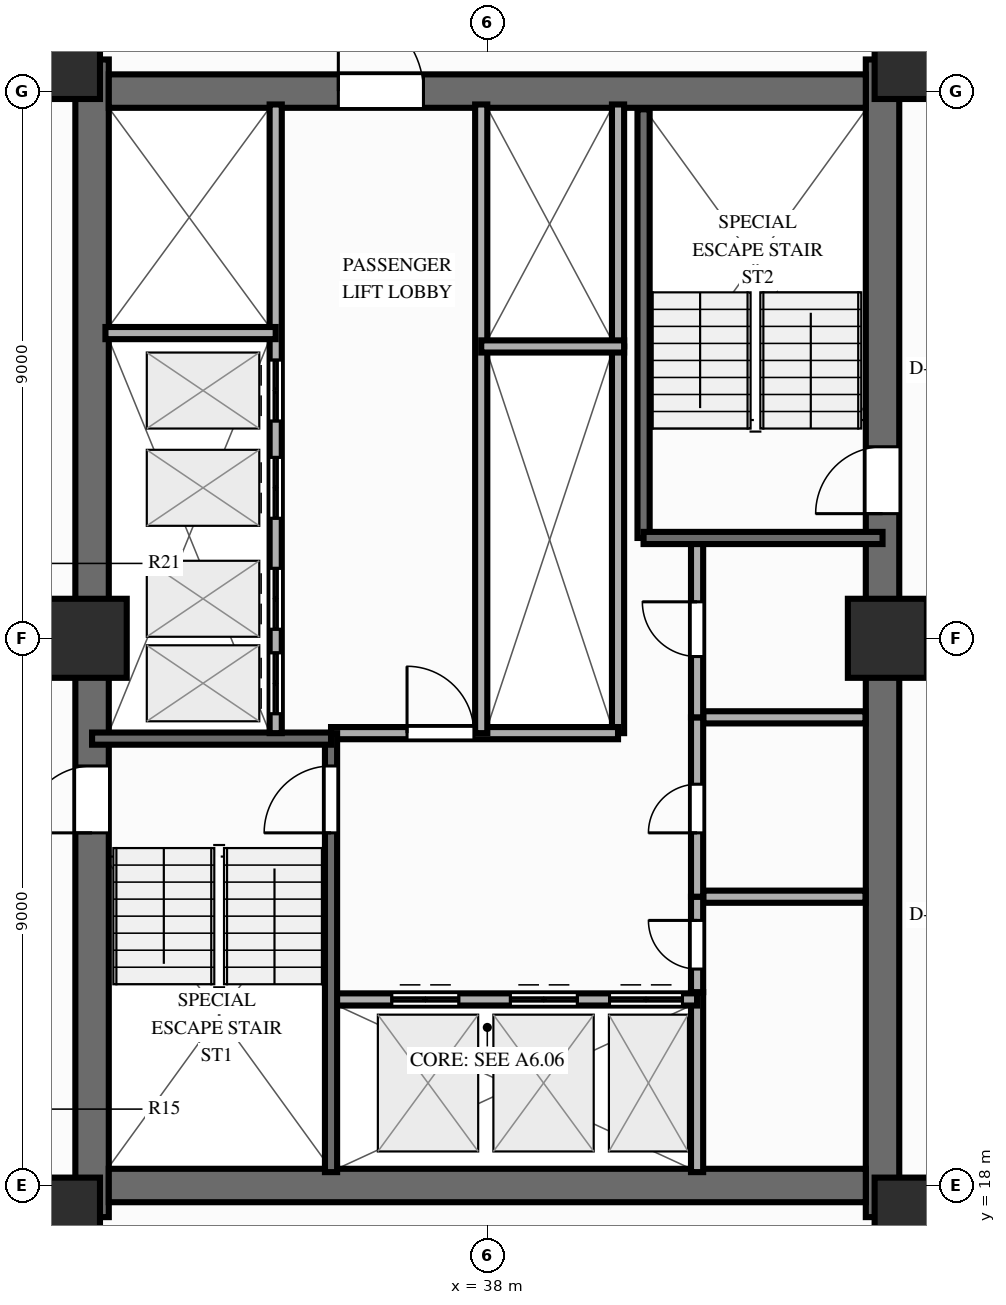
"""IFC4 building model, lengths in metres.
Left out: names, types, materials, properties, quantities, classifications, styles, units other than length and angle.
Written with IfcOpenShell. Run it as: python <this file> out.ifc"""

import sys

from ifc_helpers import new_model, si_unit, direction, frame, frame_2d, origin, origin_2d, place, context, subcontext, project, spatial, rectangle, extrude, source, transform, mapped, element, fill, save


model = new_model("IFC4")
c1 = context("Model", 3, precision=1e-05, world=origin(), true_north=direction((0.0, 1.0)))
c2 = subcontext(c1, "Body", "Model", "MODEL_VIEW")
j1 = project(units=[si_unit("LENGTHUNIT", "METRE"), si_unit("PLANEANGLEUNIT", "RADIAN")], contexts=[c1])
p1 = place(None, origin())
s1 = spatial("IfcSite", under=j1, at=p1, CompositionType="ELEMENT")
p2 = place(p1, origin())
s2 = spatial("IfcBuilding", under=s1, at=p2, CompositionType="ELEMENT")
p3 = place(p2, frame((0.0, 0.0, 80.85)))
s3 = spatial("IfcBuildingStorey", under=s2, at=p3, CompositionType="ELEMENT", Elevation=80.85)
p4 = place(p3, frame((31.5, 17.48, 0.0), z_axis=(0.0, 0.0, 1.0), x_axis=(0.0, 1.0, 0.0)))
e1 = element("IfcWall", 1, at=p4, inside=s3, PredefinedType="SHEAR", context=c2, shape_type="SweptSolid", body=[
    extrude(rectangle(XDim=19.04, YDim=0.55, at=frame_2d((9.52, 0.0))), origin(), (0.0, 0.0, 1.0), 3.0),
])
p5 = place(p4, frame((6.32, 0.0, 0.0)))
e2 = element("IfcOpeningElement", 2, at=p5, cuts=e1, PredefinedType="OPENING", context=c2, shape_type="SweptSolid", body=[
    extrude(rectangle(XDim=1.1, YDim=2.15, at=frame_2d((0.55, 1.075))), frame((0.0, 0.287, 0.0), z_axis=(0.0, -1.0, 0.0), x_axis=(1.0, 0.0, 0.0)), (0.0, 0.0, 1.0), 0.574),
])
p6 = place(p3, frame((44.5, 17.48, 0.0), z_axis=(0.0, 0.0, 1.0), x_axis=(0.0, 1.0, 0.0)))
e3 = element("IfcWall", 3, at=p6, inside=s3, PredefinedType="SHEAR", context=c2, shape_type="SweptSolid", body=[
    extrude(rectangle(XDim=19.04, YDim=0.55, at=frame_2d((9.52, 0.0))), origin(), (0.0, 0.0, 1.0), 3.0),
])
p7 = place(p6, frame((12.67, 0.0, 0.0), z_axis=(0.0, 0.0, 1.0), x_axis=(-1.0, 0.0, 0.0)))
e4 = element("IfcOpeningElement", 4, at=p7, cuts=e3, PredefinedType="OPENING", context=c2, shape_type="SweptSolid", body=[
    extrude(rectangle(XDim=1.1, YDim=2.15, at=frame_2d((0.55, 1.075))), frame((0.0, 0.287, 0.0), z_axis=(0.0, -1.0, 0.0), x_axis=(1.0, 0.0, 0.0)), (0.0, 0.0, 1.0), 0.574),
])
p8 = place(p3, frame((31.775, 18.0, 0.0), z_axis=(0.0, 0.0, 1.0), x_axis=(1.0, 0.0, 0.0)))
e5 = element("IfcWall", 5, at=p8, inside=s3, PredefinedType="SHEAR", context=c2, shape_type="SweptSolid", body=[
    extrude(rectangle(XDim=12.45, YDim=0.55, at=frame_2d((6.225, 0.0))), origin(), (0.0, 0.0, 1.0), 3.0),
])
p9 = place(p3, frame((31.775, 36.0, 0.0), z_axis=(0.0, 0.0, 1.0), x_axis=(1.0, 0.0, 0.0)))
e6 = element("IfcWall", 6, at=p9, inside=s3, PredefinedType="SHEAR", context=c2, shape_type="SweptSolid", body=[
    extrude(rectangle(XDim=12.45, YDim=0.55, at=frame_2d((6.225, 0.0))), origin(), (0.0, 0.0, 1.0), 3.0),
])
p10 = place(p9, frame((5.175, 0.0, 0.0), z_axis=(0.0, 0.0, 1.0), x_axis=(-1.0, 0.0, 0.0)))
e7 = element("IfcOpeningElement", 7, at=p10, cuts=e6, PredefinedType="OPENING", context=c2, shape_type="SweptSolid", body=[
    extrude(rectangle(XDim=1.4, YDim=2.15, at=frame_2d((0.7, 1.075))), frame((0.0, 0.287, 0.0), z_axis=(0.0, -1.0, 0.0), x_axis=(1.0, 0.0, 0.0)), (0.0, 0.0, 1.0), 0.574),
])
m1 = source(origin(), c2, "Body", "SweptSolid", [
    extrude(rectangle(XDim=1.3, YDim=1.3, at=origin_2d()), origin(), (0.0, 0.0, 1.0), 3.0),
])
for number, where, z_axis, x_axis in (
    (8, (30.98, 17.48, 0.0), (0.0, 0.0, 1.0), (1.0, 0.0, 0.0)),
    (9, (45.02, 17.48, 0.0), (0.0, 0.0, 1.0), (1.0, 0.0, 0.0)),
    (10, (30.98, 36.52, 0.0), (0.0, 0.0, 1.0), (1.0, 0.0, 0.0)),
    (11, (45.02, 36.52, 0.0), (0.0, 0.0, 1.0), (1.0, 0.0, 0.0)),
    (12, (31.42, 27.0, 0.0), (0.0, 0.0, 1.0), (1.0, 0.0, 0.0)),
    (13, (44.58, 27.0, 0.0), (0.0, 0.0, 1.0), (1.0, 0.0, 0.0)),
):
    element("IfcColumn", number, at=place(p3, frame(where, z_axis=z_axis, x_axis=x_axis)), inside=s3, PredefinedType="COLUMN", context=c2, shape_type="MappedRepresentation", body=[
        mapped(m1, transform((0.0, 0.0, 0.0), scale=1.0)),
    ])
p11 = place(p3, frame((41.55, 22.75, 0.0), z_axis=(0.0, 0.0, 1.0), x_axis=(1.0, 0.0, 0.0)))
e14 = element("IfcWall", 14, at=p11, inside=s3, PredefinedType="PARTITIONING", context=c2, shape_type="SweptSolid", body=[
    extrude(rectangle(XDim=2.67, YDim=0.2, at=frame_2d((1.335, 0.0))), origin(), (0.0, 0.0, 1.0), 2.79),
])
p12 = place(p3, frame((41.55, 25.7, 0.0), z_axis=(0.0, 0.0, 1.0), x_axis=(1.0, 0.0, 0.0)))
e15 = element("IfcWall", 15, at=p12, inside=s3, PredefinedType="PARTITIONING", context=c2, shape_type="SweptSolid", body=[
    extrude(rectangle(XDim=2.67, YDim=0.2, at=frame_2d((1.335, 0.0))), origin(), (0.0, 0.0, 1.0), 2.14),
])
p13 = place(p3, frame((41.45, 18.22, 0.0), z_axis=(0.0, 0.0, 1.0), x_axis=(0.0, 1.0, 0.0)))
e16 = element("IfcWall", 16, at=p13, inside=s3, PredefinedType="PARTITIONING", context=c2, shape_type="SweptSolid", body=[
    extrude(rectangle(XDim=2.96, YDim=0.2, at=frame_2d((1.48, 0.0))), origin(), (0.0, 0.0, 1.0), 2.79),
])
p14 = place(p3, frame((41.45, 21.18, 0.0), z_axis=(0.0, 0.0, 1.0), x_axis=(0.0, 1.0, 0.0)))
e17 = element("IfcWall", 17, at=p14, inside=s3, PredefinedType="PARTITIONING", context=c2, shape_type="SweptSolid", body=[
    extrude(rectangle(XDim=1.57, YDim=0.2, at=frame_2d((0.785, 0.0))), origin(), (0.0, 0.0, 1.0), 2.79),
])
p15 = place(p14, frame((0.38, 0.0, 0.0)))
e18 = element("IfcOpeningElement", 18, at=p15, cuts=e17, PredefinedType="OPENING", context=c2, shape_type="SweptSolid", body=[
    extrude(rectangle(XDim=0.8, YDim=2.05, at=frame_2d((0.4, 1.025))), frame((0.0, 0.112, 0.0), z_axis=(0.0, -1.0, 0.0), x_axis=(1.0, 0.0, 0.0)), (0.0, 0.0, 1.0), 0.224),
])
p16 = place(p3, frame((41.45, 22.75, 0.0), z_axis=(0.0, 0.0, 1.0), x_axis=(0.0, 1.0, 0.0)))
e19 = element("IfcWall", 19, at=p16, inside=s3, PredefinedType="PARTITIONING", context=c2, shape_type="SweptSolid", body=[
    extrude(rectangle(XDim=2.95, YDim=0.2, at=frame_2d((1.475, 0.0))), origin(), (0.0, 0.0, 1.0), 2.79),
])
p17 = place(p16, frame((1.05, 0.0, 0.0)))
e20 = element("IfcOpeningElement", 20, at=p17, cuts=e19, PredefinedType="OPENING", context=c2, shape_type="SweptSolid", body=[
    extrude(rectangle(XDim=0.8, YDim=2.05, at=frame_2d((0.4, 1.025))), frame((0.0, 0.112, 0.0), z_axis=(0.0, -1.0, 0.0), x_axis=(1.0, 0.0, 0.0)), (0.0, 0.0, 1.0), 0.224),
])
p18 = place(p3, frame((41.45, 25.7, 0.0), z_axis=(0.0, 0.0, 1.0), x_axis=(0.0, 1.0, 0.0)))
e21 = element("IfcWall", 21, at=p18, inside=s3, PredefinedType="PARTITIONING", context=c2, shape_type="SweptSolid", body=[
    extrude(rectangle(XDim=2.9, YDim=0.2, at=frame_2d((1.45, 0.0))), origin(), (0.0, 0.0, 1.0), 2.79),
])
p19 = place(p18, frame((1.0, 0.0, 0.0)))
e22 = element("IfcOpeningElement", 22, at=p19, cuts=e21, PredefinedType="OPENING", context=c2, shape_type="SweptSolid", body=[
    extrude(rectangle(XDim=0.9, YDim=2.1, at=frame_2d((0.45, 1.05))), frame((0.0, 0.112, 0.0), z_axis=(0.0, -1.0, 0.0), x_axis=(1.0, 0.0, 0.0)), (0.0, 0.0, 1.0), 0.224),
])
p20 = place(p3, frame((40.15, 25.44, 0.0), z_axis=(0.0, 0.0, 1.0), x_axis=(0.0, 1.0, 0.0)))
e23 = element("IfcWall", 23, at=p20, inside=s3, PredefinedType="PARTITIONING", context=c2, shape_type="SweptSolid", body=[
    extrude(rectangle(XDim=6.36, YDim=0.2, at=frame_2d((3.18, 0.0))), origin(), (0.0, 0.0, 1.0), 2.79),
])
p21 = place(p3, frame((40.15, 31.8, 0.0), z_axis=(0.0, 0.0, 1.0), x_axis=(0.0, 1.0, 0.0)))
e24 = element("IfcWall", 24, at=p21, inside=s3, PredefinedType="PARTITIONING", context=c2, shape_type="SweptSolid", body=[
    extrude(rectangle(XDim=3.98, YDim=0.2, at=frame_2d((1.99, 0.0))), origin(), (0.0, 0.0, 1.0), 2.79),
])
p22 = place(p3, frame((35.43, 21.06, 0.0), z_axis=(0.0, 0.0, 1.0), x_axis=(1.0, 0.0, 0.0)))
e25 = element("IfcWall", 25, at=p22, inside=s3, PredefinedType="PARTITIONING", context=c2, shape_type="SweptSolid", body=[
    extrude(rectangle(XDim=6.02, YDim=0.2, at=frame_2d((3.01, 0.0))), origin(), (0.0, 0.0, 1.0), 2.79),
])
p23 = place(p22, frame((1.0, 0.0, 0.0)))
e26 = element("IfcOpeningElement", 26, at=p23, cuts=e25, PredefinedType="OPENING", context=c2, shape_type="SweptSolid", body=[
    extrude(rectangle(XDim=1.1, YDim=2.15, at=frame_2d((0.55, 1.075))), frame((0.0, 0.112, 0.0), z_axis=(0.0, -1.0, 0.0), x_axis=(1.0, 0.0, 0.0)), (0.0, 0.0, 1.0), 0.224),
])
p24 = place(p22, frame((2.95, 0.0, 0.0)))
e27 = element("IfcOpeningElement", 27, at=p24, cuts=e25, PredefinedType="OPENING", context=c2, shape_type="SweptSolid", body=[
    extrude(rectangle(XDim=1.1, YDim=2.15, at=frame_2d((0.55, 1.075))), frame((0.0, 0.112, 0.0), z_axis=(0.0, -1.0, 0.0), x_axis=(1.0, 0.0, 0.0)), (0.0, 0.0, 1.0), 0.224),
])
p25 = place(p22, frame((4.58, 0.0, 0.0)))
e28 = element("IfcOpeningElement", 28, at=p25, cuts=e25, PredefinedType="OPENING", context=c2, shape_type="SweptSolid", body=[
    extrude(rectangle(XDim=1.2, YDim=2.15, at=frame_2d((0.6, 1.075))), frame((0.0, 0.112, 0.0), z_axis=(0.0, -1.0, 0.0), x_axis=(1.0, 0.0, 0.0)), (0.0, 0.0, 1.0), 0.224),
])
p26 = place(p3, frame((35.43, 25.44, 0.0), z_axis=(0.0, 0.0, 1.0), x_axis=(1.0, 0.0, 0.0)))
e29 = element("IfcWall", 29, at=p26, inside=s3, PredefinedType="PARTITIONING", context=c2, shape_type="SweptSolid", body=[
    extrude(rectangle(XDim=4.72, YDim=0.2, at=frame_2d((2.36, 0.0))), origin(), (0.0, 0.0, 1.0), 2.79),
])
p27 = place(p26, frame((1.25, 0.0, 0.0)))
e30 = element("IfcOpeningElement", 30, at=p27, cuts=e29, PredefinedType="OPENING", context=c2, shape_type="SweptSolid", body=[
    extrude(rectangle(XDim=1.1, YDim=2.15, at=frame_2d((0.55, 1.075))), frame((0.0, 0.112, 0.0), z_axis=(0.0, -1.0, 0.0), x_axis=(1.0, 0.0, 0.0)), (0.0, 0.0, 1.0), 0.224),
])
p28 = place(p3, frame((35.43, 18.22, 0.0), z_axis=(0.0, 0.0, 1.0), x_axis=(0.0, 1.0, 0.0)))
e31 = element("IfcWall", 31, at=p28, inside=s3, PredefinedType="SOLIDWALL", context=c2, shape_type="SweptSolid", body=[
    extrude(rectangle(XDim=7.22, YDim=0.2, at=frame_2d((3.61, 0.0))), origin(), (0.0, 0.0, 1.0), 2.79),
])
p29 = place(p28, frame((6.68, 0.0, 0.0), z_axis=(0.0, 0.0, 1.0), x_axis=(-1.0, 0.0, 0.0)))
e32 = element("IfcOpeningElement", 32, at=p29, cuts=e31, PredefinedType="OPENING", context=c2, shape_type="SweptSolid", body=[
    extrude(rectangle(XDim=1.1, YDim=2.15, at=frame_2d((0.55, 1.075))), frame((0.0, 0.112, 0.0), z_axis=(0.0, -1.0, 0.0), x_axis=(1.0, 0.0, 0.0)), (0.0, 0.0, 1.0), 0.224),
])
p30 = place(p3, frame((31.5, 25.35, 0.0), z_axis=(0.0, 0.0, 1.0), x_axis=(1.0, 0.0, 0.0)))
e33 = element("IfcWall", 33, at=p30, inside=s3, PredefinedType="SOLIDWALL", context=c2, shape_type="SweptSolid", body=[
    extrude(rectangle(XDim=3.93, YDim=0.2, at=frame_2d((1.965, 0.0))), origin(), (0.0, 0.0, 1.0), 2.79),
])
p31 = place(p3, frame((40.57, 28.65, 0.0), z_axis=(0.0, 0.0, 1.0), x_axis=(0.0, 1.0, 0.0)))
e34 = element("IfcWall", 34, at=p31, inside=s3, PredefinedType="SOLIDWALL", context=c2, shape_type="SweptSolid", body=[
    extrude(rectangle(XDim=7.05, YDim=0.2, at=frame_2d((3.525, 0.0))), origin(), (0.0, 0.0, 1.0), 2.79),
])
p32 = place(p3, frame((40.57, 28.65, 0.0), z_axis=(0.0, 0.0, 1.0), x_axis=(1.0, 0.0, 0.0)))
e35 = element("IfcWall", 35, at=p32, inside=s3, PredefinedType="SOLIDWALL", context=c2, shape_type="SweptSolid", body=[
    extrude(rectangle(XDim=3.93, YDim=0.2, at=frame_2d((1.965, 0.0))), origin(), (0.0, 0.0, 1.0), 2.79),
])
p33 = place(p3, frame((34.52, 25.44, 0.0), z_axis=(0.0, 0.0, 1.0), x_axis=(0.0, 1.0, 0.0)))
e36 = element("IfcWall", 36, at=p33, inside=s3, PredefinedType="PARTITIONING", context=c2, shape_type="SweptSolid", body=[
    extrude(rectangle(XDim=10.34, YDim=0.2, at=frame_2d((5.17, 0.0))), origin(), (0.0, 0.0, 1.0), 2.79),
])
p34 = place(p33, frame((0.32, 0.0, 0.0)))
e37 = element("IfcOpeningElement", 37, at=p34, cuts=e36, PredefinedType="OPENING", context=c2, shape_type="SweptSolid", body=[
    extrude(rectangle(XDim=1.0, YDim=2.15, at=frame_2d((0.5, 1.075))), frame((0.0, 0.112, 0.0), z_axis=(0.0, -1.0, 0.0), x_axis=(1.0, 0.0, 0.0)), (0.0, 0.0, 1.0), 0.224),
])
p35 = place(p33, frame((1.71, 0.0, 0.0)))
e38 = element("IfcOpeningElement", 38, at=p35, cuts=e36, PredefinedType="OPENING", context=c2, shape_type="SweptSolid", body=[
    extrude(rectangle(XDim=1.0, YDim=2.15, at=frame_2d((0.5, 1.075))), frame((0.0, 0.112, 0.0), z_axis=(0.0, -1.0, 0.0), x_axis=(1.0, 0.0, 0.0)), (0.0, 0.0, 1.0), 0.224),
])
p36 = place(p33, frame((3.535, 0.0, 0.0)))
e39 = element("IfcOpeningElement", 39, at=p36, cuts=e36, PredefinedType="OPENING", context=c2, shape_type="SweptSolid", body=[
    extrude(rectangle(XDim=1.0, YDim=2.15, at=frame_2d((0.5, 1.075))), frame((0.0, 0.112, 0.0), z_axis=(0.0, -1.0, 0.0), x_axis=(1.0, 0.0, 0.0)), (0.0, 0.0, 1.0), 0.224),
])
p37 = place(p33, frame((5.135, 0.0, 0.0)))
e40 = element("IfcOpeningElement", 40, at=p37, cuts=e36, PredefinedType="OPENING", context=c2, shape_type="SweptSolid", body=[
    extrude(rectangle(XDim=1.0, YDim=2.15, at=frame_2d((0.5, 1.075))), frame((0.0, 0.112, 0.0), z_axis=(0.0, -1.0, 0.0), x_axis=(1.0, 0.0, 0.0)), (0.0, 0.0, 1.0), 0.224),
])
p38 = place(p3, frame((31.72, 32.02, 0.0), z_axis=(0.0, 0.0, 1.0), x_axis=(1.0, 0.0, 0.0)))
e41 = element("IfcWall", 41, at=p38, inside=s3, PredefinedType="PARTITIONING", context=c2, shape_type="SweptSolid", body=[
    extrude(rectangle(XDim=2.8, YDim=0.2, at=frame_2d((1.4, 0.0))), origin(), (0.0, 0.0, 1.0), 2.79),
])
p39 = place(p3, frame((37.9, 25.44, 0.0), z_axis=(0.0, 0.0, 1.0), x_axis=(0.0, 1.0, 0.0)))
e42 = element("IfcWall", 42, at=p39, inside=s3, PredefinedType="PARTITIONING", context=c2, shape_type="SweptSolid", body=[
    extrude(rectangle(XDim=10.34, YDim=0.2, at=frame_2d((5.17, 0.0))), origin(), (0.0, 0.0, 1.0), 2.79),
])
p40 = place(p3, frame((37.9, 31.8, 0.0), z_axis=(0.0, 0.0, 1.0), x_axis=(1.0, 0.0, 0.0)))
e43 = element("IfcWall", 43, at=p40, inside=s3, PredefinedType="PARTITIONING", context=c2, shape_type="SweptSolid", body=[
    extrude(rectangle(XDim=2.35, YDim=0.2, at=frame_2d((1.175, 0.0))), origin(), (0.0, 0.0, 1.0), 2.79),
])
m2 = source(origin(), c2, "Body", "SweptSolid", [
    extrude(rectangle(XDim=1.1, YDim=2.15, at=frame_2d((0.55, 1.075))), frame((0.0, 0.025, 0.0), z_axis=(0.0, -1.0, 0.0), x_axis=(1.0, 0.0, 0.0)), (0.0, 0.0, 1.0), 0.05),
])
p41 = place(p5, origin())
e44 = element("IfcDoor", 44, at=p41, inside=s3, OperationType="SINGLE_SWING_LEFT", PredefinedType="DOOR", context=c2, shape_type="MappedRepresentation", body=[
    mapped(m2, transform((0.0, 0.0, 0.0), scale=1.0)),
])
fill(e2, e44)
p42 = place(p7, origin())
e45 = element("IfcDoor", 45, at=p42, inside=s3, OperationType="SINGLE_SWING_RIGHT", PredefinedType="DOOR", context=c2, shape_type="MappedRepresentation", body=[
    mapped(m2, transform((0.0, 0.0, 0.0), scale=1.0)),
])
fill(e4, e45)
m3 = source(origin(), c2, "Body", "SweptSolid", [
    extrude(rectangle(XDim=1.4, YDim=2.15, at=frame_2d((0.7, 1.075))), frame((0.0, 0.025, 0.0), z_axis=(0.0, -1.0, 0.0), x_axis=(1.0, 0.0, 0.0)), (0.0, 0.0, 1.0), 0.05),
])
p43 = place(p10, origin())
e46 = element("IfcDoor", 46, at=p43, inside=s3, OperationType="SINGLE_SWING_RIGHT", PredefinedType="DOOR", context=c2, shape_type="MappedRepresentation", body=[
    mapped(m3, transform((0.0, 0.0, 0.0), scale=1.0)),
])
fill(e7, e46)
m4 = source(origin(), c2, "Body", "SweptSolid", [
    extrude(rectangle(XDim=0.8, YDim=2.05, at=frame_2d((0.4, 1.025))), frame((0.0, 0.025, 0.0), z_axis=(0.0, -1.0, 0.0), x_axis=(1.0, 0.0, 0.0)), (0.0, 0.0, 1.0), 0.05),
])
p44 = place(p15, origin())
e47 = element("IfcDoor", 47, at=p44, inside=s3, OperationType="SINGLE_SWING_RIGHT", PredefinedType="DOOR", context=c2, shape_type="MappedRepresentation", body=[
    mapped(m4, transform((0.0, 0.0, 0.0), scale=1.0)),
])
fill(e18, e47)
p45 = place(p17, origin())
e48 = element("IfcDoor", 48, at=p45, inside=s3, OperationType="SINGLE_SWING_LEFT", PredefinedType="DOOR", context=c2, shape_type="MappedRepresentation", body=[
    mapped(m4, transform((0.0, 0.0, 0.0), scale=1.0)),
])
fill(e20, e48)
m5 = source(origin(), c2, "Body", "SweptSolid", [
    extrude(rectangle(XDim=0.9, YDim=2.1, at=frame_2d((0.45, 1.05))), frame((0.0, 0.025, 0.0), z_axis=(0.0, -1.0, 0.0), x_axis=(1.0, 0.0, 0.0)), (0.0, 0.0, 1.0), 0.05),
])
p46 = place(p19, origin())
e49 = element("IfcDoor", 49, at=p46, inside=s3, OperationType="SINGLE_SWING_RIGHT", PredefinedType="DOOR", context=c2, shape_type="MappedRepresentation", body=[
    mapped(m5, transform((0.0, 0.0, 0.0), scale=1.0)),
])
fill(e22, e49)
p47 = place(p23, origin())
e50 = element("IfcDoor", 50, at=p47, inside=s3, OperationType="DOUBLE_DOOR_SLIDING", PredefinedType="DOOR", context=c2, shape_type="MappedRepresentation", body=[
    mapped(m2, transform((0.0, 0.0, 0.0), scale=1.0)),
])
fill(e26, e50)
p48 = place(p24, origin())
e51 = element("IfcDoor", 51, at=p48, inside=s3, OperationType="DOUBLE_DOOR_SLIDING", PredefinedType="DOOR", context=c2, shape_type="MappedRepresentation", body=[
    mapped(m2, transform((0.0, 0.0, 0.0), scale=1.0)),
])
fill(e27, e51)
m6 = source(origin(), c2, "Body", "SweptSolid", [
    extrude(rectangle(XDim=1.2, YDim=2.15, at=frame_2d((0.6, 1.075))), frame((0.0, 0.025, 0.0), z_axis=(0.0, -1.0, 0.0), x_axis=(1.0, 0.0, 0.0)), (0.0, 0.0, 1.0), 0.05),
])
p49 = place(p25, origin())
e52 = element("IfcDoor", 52, at=p49, inside=s3, OperationType="DOUBLE_DOOR_SLIDING", PredefinedType="DOOR", context=c2, shape_type="MappedRepresentation", body=[
    mapped(m6, transform((0.0, 0.0, 0.0), scale=1.0)),
])
fill(e28, e52)
p50 = place(p27, origin())
e53 = element("IfcDoor", 53, at=p50, inside=s3, OperationType="SINGLE_SWING_LEFT", PredefinedType="DOOR", context=c2, shape_type="MappedRepresentation", body=[
    mapped(m2, transform((0.0, 0.0, 0.0), scale=1.0)),
])
fill(e30, e53)
p51 = place(p29, origin())
e54 = element("IfcDoor", 54, at=p51, inside=s3, OperationType="SINGLE_SWING_RIGHT", PredefinedType="DOOR", context=c2, shape_type="MappedRepresentation", body=[
    mapped(m2, transform((0.0, 0.0, 0.0), scale=1.0)),
])
fill(e32, e54)
m7 = source(origin(), c2, "Body", "SweptSolid", [
    extrude(rectangle(XDim=1.0, YDim=2.15, at=frame_2d((0.5, 1.075))), frame((0.0, 0.025, 0.0), z_axis=(0.0, -1.0, 0.0), x_axis=(1.0, 0.0, 0.0)), (0.0, 0.0, 1.0), 0.05),
])
p52 = place(p34, origin())
e55 = element("IfcDoor", 55, at=p52, inside=s3, OperationType="DOUBLE_DOOR_SLIDING", PredefinedType="DOOR", context=c2, shape_type="MappedRepresentation", body=[
    mapped(m7, transform((0.0, 0.0, 0.0), scale=1.0)),
])
fill(e37, e55)
p53 = place(p35, origin())
e56 = element("IfcDoor", 56, at=p53, inside=s3, OperationType="DOUBLE_DOOR_SLIDING", PredefinedType="DOOR", context=c2, shape_type="MappedRepresentation", body=[
    mapped(m7, transform((0.0, 0.0, 0.0), scale=1.0)),
])
fill(e38, e56)
p54 = place(p36, origin())
e57 = element("IfcDoor", 57, at=p54, inside=s3, OperationType="DOUBLE_DOOR_SLIDING", PredefinedType="DOOR", context=c2, shape_type="MappedRepresentation", body=[
    mapped(m7, transform((0.0, 0.0, 0.0), scale=1.0)),
])
fill(e39, e57)
p55 = place(p37, origin())
e58 = element("IfcDoor", 58, at=p55, inside=s3, OperationType="DOUBLE_DOOR_SLIDING", PredefinedType="DOOR", context=c2, shape_type="MappedRepresentation", body=[
    mapped(m7, transform((0.0, 0.0, 0.0), scale=1.0)),
])
fill(e40, e58)
save(model, sys.argv[1])
